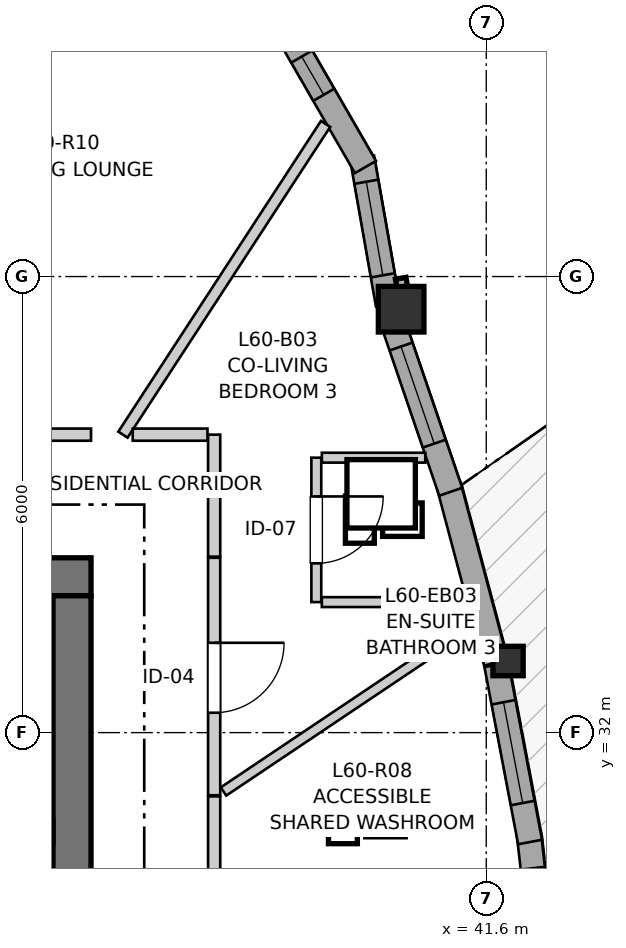
"""IFC4 building model, lengths in metres.
Left out: names, types, materials, properties, quantities, classifications, styles, units other than length and angle.
Written with IfcOpenShell. Run it as: python <this file> out.ifc"""

import sys

from ifc_helpers import new_model, si_unit, direction, frame, frame_2d, origin, origin_2d, place, context, subcontext, project, spatial, rectangle, i_section, extrude, source, transform, mapped, element, fill, save


model = new_model("IFC4")
c1 = context("Model", 3, precision=1e-05, world=origin(), true_north=direction((0.0, 1.0)))
c2 = subcontext(c1, "Body", "Model", "MODEL_VIEW")
j1 = project(units=[si_unit("LENGTHUNIT", "METRE"), si_unit("PLANEANGLEUNIT", "RADIAN")], contexts=[c1])
p1 = place(None, origin())
s1 = spatial("IfcSite", under=j1, at=p1, CompositionType="ELEMENT")
p2 = place(p1, origin())
s2 = spatial("IfcBuilding", under=s1, at=p2, CompositionType="ELEMENT")
p3 = place(p2, frame((0.0, 0.0, 202.0)))
s3 = spatial("IfcBuildingStorey", under=s2, at=p3, CompositionType="ELEMENT", Elevation=202.0)
p4 = place(p3, frame((36.4, 34.05, 0.0), z_axis=(0.0, 0.0, 1.0), x_axis=(-1.0, 0.0, 0.0)))
e1 = element("IfcWall", 1, at=p4, inside=s3, PredefinedType="SHEAR", context=c2, shape_type="SweptSolid", body=[
    extrude(rectangle(XDim=12.1, YDim=0.5, at=frame_2d((6.05, 0.0))), origin(), (0.0, 0.0, 1.0), 2.935),
])
p5 = place(p3, frame((36.15, 18.2, 0.0), z_axis=(0.0, 0.0, 1.0), x_axis=(0.0, 1.0, 0.0)))
e2 = element("IfcWall", 2, at=p5, inside=s3, PredefinedType="SHEAR", context=c2, shape_type="SweptSolid", body=[
    extrude(rectangle(XDim=15.6, YDim=0.5, at=frame_2d((7.8, 0.0))), origin(), (0.0, 0.0, 1.0), 2.935),
])
p6 = place(p5, frame((4.25, 0.0, 0.0)))
e3 = element("IfcOpeningElement", 3, at=p6, cuts=e2, PredefinedType="OPENING", context=c2, shape_type="SweptSolid", body=[
    extrude(rectangle(XDim=1.1, YDim=2.15, at=frame_2d((0.55, 1.075))), frame((0.0, 0.26, 0.0), z_axis=(0.0, -1.0, 0.0), x_axis=(1.0, 0.0, 0.0)), (0.0, 0.0, 1.0), 0.52),
])
p7 = place(p5, frame((10.25, 0.0, 0.0)))
e4 = element("IfcOpeningElement", 4, at=p7, cuts=e2, PredefinedType="OPENING", context=c2, shape_type="SweptSolid", body=[
    extrude(rectangle(XDim=1.1, YDim=2.15, at=frame_2d((0.55, 1.075))), frame((0.0, 0.26, 0.0), z_axis=(0.0, -1.0, 0.0), x_axis=(1.0, 0.0, 0.0)), (0.0, 0.0, 1.0), 0.52),
])
p8 = place(p3, frame((24.8, 30.7, 0.0), z_axis=(0.0, 0.0, 1.0), x_axis=(1.0, 0.0, 0.0)))
e5 = element("IfcWall", 5, at=p8, inside=s3, PredefinedType="SHEAR", context=c2, shape_type="SweptSolid", body=[
    extrude(rectangle(XDim=11.1, YDim=0.3, at=frame_2d((5.55, 0.0))), origin(), (0.0, 0.0, 1.0), 2.935),
])
p9 = place(p8, frame((6.22, 0.0, 0.0)))
e6 = element("IfcOpeningElement", 6, at=p9, cuts=e5, PredefinedType="OPENING", context=c2, shape_type="SweptSolid", body=[
    extrude(rectangle(XDim=0.98, YDim=2.15, at=frame_2d((0.49, 1.075))), frame((0.0, 0.16, 0.0), z_axis=(0.0, -1.0, 0.0), x_axis=(1.0, 0.0, 0.0)), (0.0, 0.0, 1.0), 0.32),
])
p10 = place(p8, frame((9.15, 0.0, 0.0)))
e7 = element("IfcOpeningElement", 7, at=p10, cuts=e5, PredefinedType="OPENING", context=c2, shape_type="SweptSolid", body=[
    extrude(rectangle(XDim=1.15, YDim=2.15, at=frame_2d((0.575, 1.075))), frame((0.0, 0.16, 0.0), z_axis=(0.0, -1.0, 0.0), x_axis=(1.0, 0.0, 0.0)), (0.0, 0.0, 1.0), 0.32),
])
m1 = source(origin(), c2, "Body", "SweptSolid", [
    extrude(i_section(OverallWidth=0.398, OverallDepth=0.387, WebThickness=0.019, FlangeThickness=0.03, FilletRadius=0.015, at=origin_2d()), origin(), (0.0, 0.0, 1.0), 2.935),
])
p11 = place(p3, frame((41.887, 32.942, 0.0), z_axis=(0.0, 0.0, 1.0), x_axis=(1.0, 0.0, 0.0)))
e8 = element("IfcColumn", 8, at=p11, inside=s3, PredefinedType="PILASTER", context=c2, shape_type="MappedRepresentation", body=[
    mapped(m1, transform((0.0, 0.0, 0.0), x_axis=(1.0, 0.0, 0.0), y_axis=(0.0, 1.0, 0.0), z_axis=(0.0, 0.0, 1.0), scale=1.0)),
])
m2 = source(origin(), c2, "Body", "SweptSolid", [
    extrude(rectangle(XDim=0.6, YDim=0.6, at=origin_2d()), origin(), (0.0, 0.0, 1.0), 2.935),
])
p12 = place(p3, frame((40.48, 37.57, 0.0), z_axis=(0.0, 0.0, 1.0), x_axis=(1.0, 0.0, 0.0)))
e9 = element("IfcColumn", 9, at=p12, inside=s3, PredefinedType="COLUMN", context=c2, shape_type="MappedRepresentation", body=[
    mapped(m2, transform((0.0, 0.0, 0.0), x_axis=(1.0, 0.0, 0.0), y_axis=(0.0, 1.0, 0.0), z_axis=(0.0, 0.0, 1.0), scale=1.0)),
])
p13 = place(p3, frame((42.421, 28.385, 0.0), z_axis=(0.0, 0.0, 1.0), x_axis=(-0.113220012761, 0.993569941529, 0.0)))
e10 = element("IfcWall", 10, at=p13, inside=s3, PredefinedType="SOLIDWALL", context=c2, shape_type="SweptSolid", body=[
    extrude(rectangle(XDim=2.277, YDim=0.32, at=frame_2d((1.139, 0.0))), origin(), (0.0, 0.0, 1.0), 2.555),
])
p14 = place(p13, frame((0.842, 0.0, 0.0)))
e11 = element("IfcOpeningElement", 11, at=p14, cuts=e10, PredefinedType="OPENING", context=c2, shape_type="SweptSolid", body=[
    extrude(rectangle(XDim=1.0, YDim=2.1, at=frame_2d((0.5, 1.05))), frame((0.0, 0.17, 0.0), z_axis=(0.0, -1.0, 0.0), x_axis=(1.0, 0.0, 0.0)), (0.0, 0.0, 1.0), 0.34),
])
p15 = place(p3, frame((42.177, 30.561, 0.0), z_axis=(0.0, 0.0, 1.0), x_axis=(-0.186691421418, 0.982418603839, 0.0)))
e12 = element("IfcWall", 12, at=p15, inside=s3, PredefinedType="SOLIDWALL", context=c2, shape_type="SweptSolid", body=[
    extrude(rectangle(XDim=2.374, YDim=0.32, at=frame_2d((1.187, 0.0))), origin(), (0.0, 0.0, 1.0), 2.555),
])
p16 = place(p15, frame((0.522, 0.0, 0.82)))
e13 = element("IfcOpeningElement", 13, at=p16, cuts=e12, PredefinedType="OPENING", context=c2, shape_type="SweptSolid", body=[
    extrude(rectangle(XDim=1.35, YDim=1.45, at=frame_2d((0.675, 0.725))), frame((0.0, 0.17, 0.0), z_axis=(0.0, -1.0, 0.0), x_axis=(1.0, 0.0, 0.0)), (0.0, 0.0, 1.0), 0.34),
])
p17 = place(p3, frame((41.727, 32.92, 0.0), z_axis=(0.0, 0.0, 1.0), x_axis=(-0.257057896323, 0.96639600472, 0.0)))
e14 = element("IfcWall", 14, at=p17, inside=s3, PredefinedType="SOLIDWALL", context=c2, shape_type="SweptSolid", body=[
    extrude(rectangle(XDim=2.412, YDim=0.32, at=frame_2d((1.206, 0.0))), origin(), (0.0, 0.0, 1.0), 2.555),
])
p18 = place(p3, frame((41.132, 35.168, 0.0), z_axis=(0.0, 0.0, 1.0), x_axis=(-0.323654036362, 0.94617549363, 0.0)))
e15 = element("IfcWall", 15, at=p18, inside=s3, PredefinedType="SOLIDWALL", context=c2, shape_type="SweptSolid", body=[
    extrude(rectangle(XDim=2.394, YDim=0.32, at=frame_2d((1.197, 0.0))), origin(), (0.0, 0.0, 1.0), 2.555),
])
p19 = place(p18, frame((0.67, 0.0, 0.82)))
e16 = element("IfcOpeningElement", 16, at=p19, cuts=e15, PredefinedType="OPENING", context=c2, shape_type="SweptSolid", body=[
    extrude(rectangle(XDim=1.35, YDim=1.45, at=frame_2d((0.675, 0.725))), frame((0.0, 0.17, 0.0), z_axis=(0.0, -1.0, 0.0), x_axis=(1.0, 0.0, 0.0)), (0.0, 0.0, 1.0), 0.34),
])
p20 = place(p3, frame((40.307, 37.631, 0.0), z_axis=(0.0, 0.0, 1.0), x_axis=(-0.173671780312, 0.984803590937, 0.0)))
e17 = element("IfcWall", 17, at=p20, inside=s3, PredefinedType="SOLIDWALL", context=c2, shape_type="SweptSolid", body=[
    extrude(rectangle(XDim=1.962, YDim=0.32, at=frame_2d((0.981, 0.0))), origin(), (0.0, 0.0, 1.0), 2.555),
])
p21 = place(p20, frame((0.391, 0.0, 0.82)))
e18 = element("IfcOpeningElement", 18, at=p21, cuts=e17, PredefinedType="OPENING", context=c2, shape_type="SweptSolid", body=[
    extrude(rectangle(XDim=1.25, YDim=1.35, at=frame_2d((0.625, 0.675))), frame((0.0, 0.17, 0.0), z_axis=(0.0, -1.0, 0.0), x_axis=(1.0, 0.0, 0.0)), (0.0, 0.0, 1.0), 0.34),
])
p22 = place(p3, frame((40.01, 39.441, 0.0), z_axis=(0.0, 0.0, 1.0), x_axis=(-0.49990781971, 0.866078617559, 0.0)))
e19 = element("IfcWall", 19, at=p22, inside=s3, PredefinedType="SOLIDWALL", context=c2, shape_type="SweptSolid", body=[
    extrude(rectangle(XDim=2.09, YDim=0.32, at=frame_2d((1.045, 0.0))), origin(), (0.0, 0.0, 1.0), 2.555),
])
p23 = place(p22, frame((1.097, 0.0, 0.82)))
e20 = element("IfcOpeningElement", 20, at=p23, cuts=e19, PredefinedType="OPENING", context=c2, shape_type="SweptSolid", body=[
    extrude(rectangle(XDim=0.58, YDim=1.35, at=frame_2d((0.29, 0.675))), frame((0.0, 0.17, 0.0), z_axis=(0.0, -1.0, 0.0), x_axis=(1.0, 0.0, 0.0)), (0.0, 0.0, 1.0), 0.34),
])
p24 = place(p3, frame((32.487, 35.92, 0.0), z_axis=(0.0, 0.0, 1.0), x_axis=(1.0, 0.0, 0.0)))
e21 = element("IfcWall", 21, at=p24, inside=s3, PredefinedType="PARTITIONING", context=c2, shape_type="SweptSolid", body=[
    extrude(rectangle(XDim=3.913, YDim=0.16, at=frame_2d((1.957, 0.0))), origin(), (0.0, 0.0, 1.0), 2.935),
])
p25 = place(p24, frame((1.291, 0.0, 0.0)))
e22 = element("IfcOpeningElement", 22, at=p25, cuts=e21, PredefinedType="OPENING", context=c2, shape_type="SweptSolid", body=[
    extrude(rectangle(XDim=1.3, YDim=2.1, at=frame_2d((0.65, 1.05))), frame((0.0, 0.09, 0.0), z_axis=(0.0, -1.0, 0.0), x_axis=(1.0, 0.0, 0.0)), (0.0, 0.0, 1.0), 0.18),
])
p26 = place(p3, frame((38.02, 31.161, 0.0), z_axis=(0.0, 0.0, 1.0), x_axis=(0.0, -1.0, 0.0)))
e23 = element("IfcWall", 23, at=p26, inside=s3, PredefinedType="PARTITIONING", context=c2, shape_type="SweptSolid", body=[
    extrude(rectangle(XDim=3.333, YDim=0.16, at=frame_2d((1.667, 0.0))), origin(), (0.0, 0.0, 1.0), 2.603),
])
p27 = place(p26, frame((1.193, 0.0, 0.0)))
e24 = element("IfcOpeningElement", 24, at=p27, cuts=e23, PredefinedType="OPENING", context=c2, shape_type="SweptSolid", body=[
    extrude(rectangle(XDim=0.95, YDim=2.1, at=frame_2d((0.475, 1.05))), frame((0.0, 0.09, 0.0), z_axis=(0.0, -1.0, 0.0), x_axis=(1.0, 0.0, 0.0)), (0.0, 0.0, 1.0), 0.18),
])
p28 = place(p3, frame((38.02, 34.3, 0.0), z_axis=(0.0, 0.0, 1.0), x_axis=(0.0, -1.0, 0.0)))
e25 = element("IfcWall", 25, at=p28, inside=s3, PredefinedType="PARTITIONING", context=c2, shape_type="SweptSolid", body=[
    extrude(rectangle(XDim=3.124, YDim=0.16, at=frame_2d((1.562, 0.0))), origin(), (0.0, 0.0, 1.0), 2.603),
])
p29 = place(p28, frame((1.118, 0.0, 0.0)))
e26 = element("IfcOpeningElement", 26, at=p29, cuts=e25, PredefinedType="OPENING", context=c2, shape_type="SweptSolid", body=[
    extrude(rectangle(XDim=0.92, YDim=2.1, at=frame_2d((0.46, 1.05))), frame((0.0, 0.09, 0.0), z_axis=(0.0, -1.0, 0.0), x_axis=(1.0, 0.0, 0.0)), (0.0, 0.0, 1.0), 0.18),
])
p30 = place(p3, frame((39.364, 35.617, 0.0), z_axis=(0.0, 0.0, 1.0), x_axis=(0.0, -1.0, 0.0)))
e27 = element("IfcWall", 27, at=p30, inside=s3, PredefinedType="PARTITIONING", context=c2, shape_type="SweptSolid", body=[
    extrude(rectangle(XDim=1.9, YDim=0.13, at=frame_2d((0.95, 0.0))), origin(), (0.0, 0.0, 1.0), 2.573),
])
p31 = place(p30, frame((0.51, 0.0, 0.0)))
e28 = element("IfcOpeningElement", 28, at=p31, cuts=e27, PredefinedType="OPENING", context=c2, shape_type="SweptSolid", body=[
    extrude(rectangle(XDim=0.88, YDim=2.05, at=frame_2d((0.44, 1.025))), frame((0.0, 0.075, 0.0), z_axis=(0.0, -1.0, 0.0), x_axis=(1.0, 0.0, 0.0)), (0.0, 0.0, 1.0), 0.15),
])
p32 = place(p3, frame((36.82, 35.92, 0.0), z_axis=(0.0, 0.0, 1.0), x_axis=(0.546222005159, 0.83764044857, 0.0)))
e29 = element("IfcWall", 29, at=p32, inside=s3, PredefinedType="PARTITIONING", context=c2, shape_type="SweptSolid", body=[
    extrude(rectangle(XDim=4.881, YDim=0.145, at=frame_2d((2.44, 0.0))), origin(), (0.0, 0.0, 1.0), 2.935),
])
p33 = place(p3, frame((38.143, 31.225, 0.0), z_axis=(0.0, 0.0, 1.0), x_axis=(0.830560844451, 0.556927898084, 0.0)))
e30 = element("IfcWall", 30, at=p33, inside=s3, PredefinedType="PARTITIONING", context=c2, shape_type="SweptSolid", body=[
    extrude(rectangle(XDim=3.942, YDim=0.13, at=frame_2d((1.971, 0.0))), origin(), (0.0, 0.0, 1.0), 2.935),
])
p34 = place(p3, frame((39.437, 33.717, 0.0), z_axis=(0.0, 0.0, 1.0), x_axis=(1.0, 0.0, 0.0)))
e31 = element("IfcWall", 31, at=p34, inside=s3, PredefinedType="PARTITIONING", context=c2, shape_type="SweptSolid", body=[
    extrude(rectangle(XDim=1.727, YDim=0.13, at=frame_2d((0.864, 0.0))), origin(), (0.0, 0.0, 1.0), 2.935),
])
p35 = place(p3, frame((38.02, 34.315, 0.0), z_axis=(0.0, 0.0, 1.0), x_axis=(0.0, 1.0, 0.0)))
e32 = element("IfcWall", 32, at=p35, inside=s3, PredefinedType="PARTITIONING", context=c2, shape_type="SweptSolid", body=[
    extrude(rectangle(XDim=1.605, YDim=0.16, at=frame_2d((0.802, 0.0))), origin(), (0.0, 0.0, 1.0), 2.603),
])
p36 = place(p3, frame((39.437, 35.617, 0.0), z_axis=(0.0, 0.0, 1.0), x_axis=(1.0, 0.0, 0.0)))
e33 = element("IfcWall", 33, at=p36, inside=s3, PredefinedType="PARTITIONING", context=c2, shape_type="SweptSolid", body=[
    extrude(rectangle(XDim=1.361, YDim=0.13, at=frame_2d((0.68, 0.0))), origin(), (0.0, 0.0, 1.0), 2.935),
])
p37 = place(p3, frame((36.949, 35.92, 0.0), z_axis=(0.0, 0.0, 1.0), x_axis=(1.0, 0.0, 0.0)))
e34 = element("IfcWall", 34, at=p37, inside=s3, PredefinedType="PARTITIONING", context=c2, shape_type="SweptSolid", body=[
    extrude(rectangle(XDim=0.983, YDim=0.16, at=frame_2d((0.492, 0.0))), origin(), (0.0, 0.0, 1.0), 2.935),
])
m3 = source(origin(), c2, "Body", "SweptSolid", [
    extrude(rectangle(XDim=1.35, YDim=1.45, at=frame_2d((0.675, 0.725))), frame((0.0, 0.03, 0.0), z_axis=(0.0, -1.0, 0.0), x_axis=(1.0, 0.0, 0.0)), (0.0, 0.0, 1.0), 0.06),
])
p38 = place(p16, origin())
e35 = element("IfcWindow", 35, at=p38, inside=s3, PartitioningType="SINGLE_PANEL", PredefinedType="WINDOW", context=c2, shape_type="MappedRepresentation", body=[
    mapped(m3, transform((0.0, 0.0, 0.0), x_axis=(1.0, 0.0, 0.0), y_axis=(0.0, 1.0, 0.0), z_axis=(0.0, 0.0, 1.0), scale=1.0)),
])
fill(e13, e35)
p39 = place(p19, origin())
e36 = element("IfcWindow", 36, at=p39, inside=s3, PartitioningType="SINGLE_PANEL", PredefinedType="WINDOW", context=c2, shape_type="MappedRepresentation", body=[
    mapped(m3, transform((0.0, 0.0, 0.0), x_axis=(1.0, 0.0, 0.0), y_axis=(0.0, 1.0, 0.0), z_axis=(0.0, 0.0, 1.0), scale=1.0)),
])
fill(e16, e36)
m4 = source(origin(), c2, "Body", "SweptSolid", [
    extrude(rectangle(XDim=1.25, YDim=1.35, at=frame_2d((0.625, 0.675))), frame((0.0, 0.03, 0.0), z_axis=(0.0, -1.0, 0.0), x_axis=(1.0, 0.0, 0.0)), (0.0, 0.0, 1.0), 0.06),
])
p40 = place(p21, origin())
e37 = element("IfcWindow", 37, at=p40, inside=s3, PartitioningType="SINGLE_PANEL", PredefinedType="WINDOW", context=c2, shape_type="MappedRepresentation", body=[
    mapped(m4, transform((0.0, 0.0, 0.0), x_axis=(1.0, 0.0, 0.0), y_axis=(0.0, 1.0, 0.0), z_axis=(0.0, 0.0, 1.0), scale=1.0)),
])
fill(e18, e37)
m5 = source(origin(), c2, "Body", "SweptSolid", [
    extrude(rectangle(XDim=0.58, YDim=1.35, at=frame_2d((0.29, 0.675))), frame((0.0, 0.03, 0.0), z_axis=(0.0, -1.0, 0.0), x_axis=(1.0, 0.0, 0.0)), (0.0, 0.0, 1.0), 0.06),
])
p41 = place(p23, origin())
e38 = element("IfcWindow", 38, at=p41, inside=s3, PartitioningType="SINGLE_PANEL", PredefinedType="WINDOW", context=c2, shape_type="MappedRepresentation", body=[
    mapped(m5, transform((0.0, 0.0, 0.0), x_axis=(1.0, 0.0, 0.0), y_axis=(0.0, 1.0, 0.0), z_axis=(0.0, 0.0, 1.0), scale=1.0)),
])
fill(e20, e38)
m6 = source(origin(), c2, "Body", "SweptSolid", [
    extrude(rectangle(XDim=0.92, YDim=2.1, at=frame_2d((0.46, 1.05))), frame((0.0, 0.025, 0.0), z_axis=(0.0, -1.0, 0.0), x_axis=(1.0, 0.0, 0.0)), (0.0, 0.0, 1.0), 0.05),
])
p42 = place(p29, origin())
e39 = element("IfcDoor", 39, at=p42, inside=s3, OperationType="SINGLE_SWING_LEFT", PredefinedType="DOOR", context=c2, shape_type="MappedRepresentation", body=[
    mapped(m6, transform((0.0, 0.0, 0.0), x_axis=(1.0, 0.0, 0.0), y_axis=(0.0, 1.0, 0.0), z_axis=(0.0, 0.0, 1.0), scale=1.0)),
])
fill(e26, e39)
m7 = source(origin(), c2, "Body", "SweptSolid", [
    extrude(rectangle(XDim=0.88, YDim=2.05, at=frame_2d((0.44, 1.025))), frame((0.0, 0.025, 0.0), z_axis=(0.0, -1.0, 0.0), x_axis=(1.0, 0.0, 0.0)), (0.0, 0.0, 1.0), 0.05),
])
p43 = place(p31, origin())
e40 = element("IfcDoor", 40, at=p43, inside=s3, OperationType="SINGLE_SWING_LEFT", PredefinedType="DOOR", context=c2, shape_type="MappedRepresentation", body=[
    mapped(m7, transform((0.0, 0.0, 0.0), x_axis=(1.0, 0.0, 0.0), y_axis=(0.0, 1.0, 0.0), z_axis=(0.0, 0.0, 1.0), scale=1.0)),
])
fill(e28, e40)
save(model, sys.argv[1])
